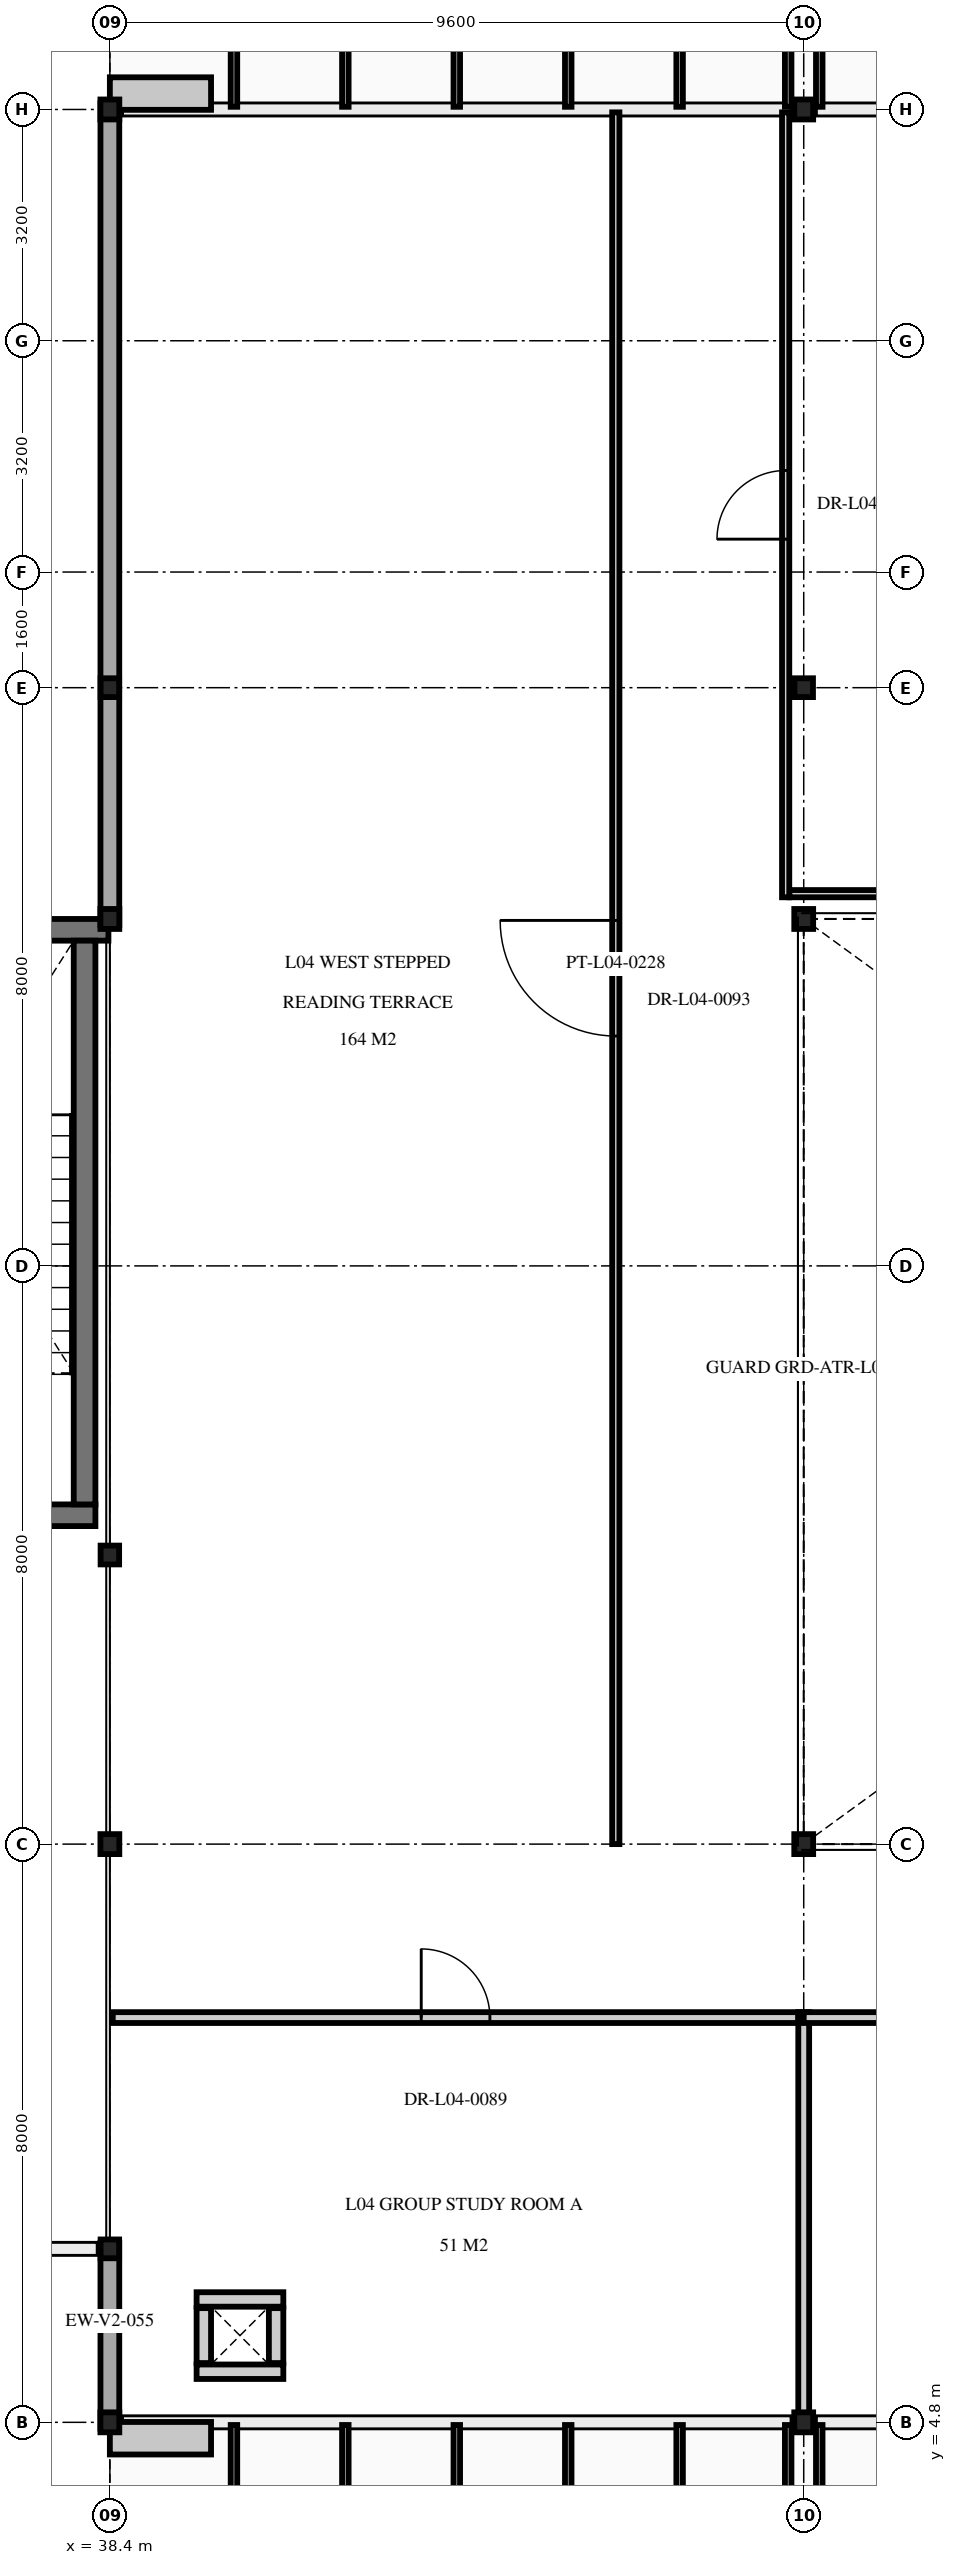
"""IFC4 building model, lengths in metres.
Left out: names, types, materials, properties, quantities, classifications, styles, units other than length and angle.
Written with IfcOpenShell. Run it as: python <this file> out.ifc"""

import sys

from ifc_helpers import new_model, si_unit, direction, frame, frame_2d, origin, origin_2d, place, context, subcontext, project, spatial, rectangle, i_section, extrude, element, fill, save


model = new_model("IFC4")
c1 = context("Model", 3, precision=1e-05, world=origin(), true_north=direction((0.0, 1.0)))
c2 = subcontext(c1, "Body", "Model", "MODEL_VIEW")
j1 = project(units=[si_unit("LENGTHUNIT", "METRE"), si_unit("PLANEANGLEUNIT", "RADIAN")], contexts=[c1])
p1 = place(None, origin())
s1 = spatial("IfcSite", under=j1, at=p1, CompositionType="ELEMENT")
p2 = place(p1, origin())
s2 = spatial("IfcBuilding", under=s1, at=p2, CompositionType="ELEMENT")
p3 = place(p2, frame((0.0, 0.0, 18.6)))
s3 = spatial("IfcBuildingStorey", under=s2, at=p3, CompositionType="ELEMENT", Elevation=18.6)
for number, where, z_axis, x_axis in (
    (1, (38.4, 4.8, 0.0), (0.0, 0.0, 1.0), (1.0, 0.0, 0.0)),
    (2, (38.4, 12.8, 0.0), (0.0, 0.0, 1.0), (1.0, 0.0, 0.0)),
    (3, (38.4, 25.6, 0.0), (0.0, 0.0, 1.0), (1.0, 0.0, 0.0)),
    (4, (38.4, 36.8, 0.0), (0.0, 0.0, 1.0), (1.0, 0.0, 0.0)),
    (5, (48.0, 4.8, 0.0), (0.0, 0.0, 1.0), (1.0, 0.0, 0.0)),
    (6, (48.0, 12.8, 0.0), (0.0, 0.0, 1.0), (1.0, 0.0, 0.0)),
    (7, (48.0, 25.6, 0.0), (0.0, 0.0, 1.0), (1.0, 0.0, 0.0)),
):
    element("IfcColumn", number, at=place(p3, frame(where, z_axis=z_axis, x_axis=x_axis)), inside=s3, PredefinedType="COLUMN", context=c2, shape_type="SweptSolid", body=[
        extrude(i_section(OverallWidth=0.261, OverallDepth=0.276, WebThickness=0.015, FlangeThickness=0.025, at=origin_2d()), origin(), (0.0, 0.0, 1.0), 4.5),
    ])
p4 = place(p3, frame((48.0, 36.8, 0.0), z_axis=(0.0, 0.0, 1.0), x_axis=(1.0, 0.0, 0.0)))
e8 = element("IfcColumn", 8, at=p4, inside=s3, PredefinedType="COLUMN", context=c2, shape_type="SweptSolid", body=[
    extrude(i_section(OverallWidth=0.261, OverallDepth=0.276, WebThickness=0.015, FlangeThickness=0.025, at=origin_2d()), origin(), (0.0, 0.0, 1.0), 4.31),
])
for number, where, z_axis, x_axis in (
    (9, (38.4, 28.8, 0.0), (0.0, 0.0, 1.0), (1.0, 0.0, 0.0)),
    (10, (48.0, 28.8, 0.0), (0.0, 0.0, 1.0), (1.0, 0.0, 0.0)),
    (11, (38.4, 7.2, 0.0), (0.0, 0.0, 1.0), (1.0, 0.0, 0.0)),
    (12, (38.4, 16.8, 0.0), (0.0, 0.0, 1.0), (1.0, 0.0, 0.0)),
):
    element("IfcColumn", number, at=place(p3, frame(where, z_axis=z_axis, x_axis=x_axis)), inside=s3, PredefinedType="COLUMN", context=c2, shape_type="SweptSolid", body=[
        extrude(i_section(OverallWidth=0.256, OverallDepth=0.26, WebThickness=0.01, FlangeThickness=0.017, at=origin_2d()), origin(), (0.0, 0.0, 1.0), 4.5),
    ])
p5 = place(p3, frame((38.2, 17.35, 0.0), z_axis=(0.0, 0.0, 1.0), x_axis=(-1.0, 0.0, 0.0)))
e13 = element("IfcWall", 13, at=p5, inside=s3, PredefinedType="SHEAR", context=c2, shape_type="SweptSolid", body=[
    extrude(rectangle(XDim=4.4, YDim=0.3, at=frame_2d((2.2, 0.0))), origin(), (0.0, 0.0, 1.0), 4.28),
])
p6 = place(p5, frame((1.65, 0.0, 0.0)))
e14 = element("IfcOpeningElement", 14, at=p6, cuts=e13, PredefinedType="OPENING", context=c2, shape_type="SweptSolid", body=[
    extrude(rectangle(XDim=1.1, YDim=2.2, at=frame_2d((0.55, 1.1))), frame((0.0, 0.16, 0.0), z_axis=(0.0, -1.0, 0.0), x_axis=(1.0, 0.0, 0.0)), (0.0, 0.0, 1.0), 0.32),
])
p7 = place(p3, frame((33.62, 25.45, 0.0), z_axis=(0.0, 0.0, 1.0), x_axis=(1.0, 0.0, 0.0)))
e15 = element("IfcWall", 15, at=p7, inside=s3, PredefinedType="SHEAR", context=c2, shape_type="SweptSolid", body=[
    extrude(rectangle(XDim=4.76, YDim=0.3, at=frame_2d((2.38, 0.0))), origin(), (0.0, 0.0, 1.0), 4.28),
])
p8 = place(p3, frame((38.05, 25.3, 0.0), z_axis=(0.0, 0.0, 1.0), x_axis=(0.0, -1.0, 0.0)))
e16 = element("IfcWall", 16, at=p8, inside=s3, PredefinedType="SHEAR", context=c2, shape_type="SweptSolid", body=[
    extrude(rectangle(XDim=7.8, YDim=0.3, at=frame_2d((3.9, 0.0))), origin(), (0.0, 0.0, 1.0), 4.28),
])
for number, where, z_axis, x_axis in (
    (17, (40.8, 5.5, 0.0), (0.0, 0.0, 1.0), (-1.0, 0.0, 0.0)),
    (18, (39.6, 6.5, 0.0), (0.0, 0.0, 1.0), (1.0, 0.0, 0.0)),
):
    element("IfcWall", number, at=place(p3, frame(where, z_axis=z_axis, x_axis=x_axis)), inside=s3, PredefinedType="PARTITIONING", context=c2, shape_type="SweptSolid", body=[
        extrude(rectangle(XDim=1.2, YDim=0.2, at=frame_2d((0.6, 0.0))), origin(), (0.0, 0.0, 1.0), 3.78),
    ])
for number, where, z_axis, x_axis in (
    (19, (39.7, 5.62, 0.0), (0.0, 0.0, 1.0), (0.0, 1.0, 0.0)),
    (20, (40.7, 6.38, 0.0), (0.0, 0.0, 1.0), (0.0, -1.0, 0.0)),
):
    element("IfcWall", number, at=place(p3, frame(where, z_axis=z_axis, x_axis=x_axis)), inside=s3, PredefinedType="PARTITIONING", context=c2, shape_type="SweptSolid", body=[
        extrude(rectangle(XDim=0.76, YDim=0.2, at=frame_2d((0.38, 0.0))), origin(), (0.0, 0.0, 1.0), 3.78),
    ])
p9 = place(p3, frame((38.4, 4.715, 0.0), z_axis=(0.0, 0.0, 1.0), x_axis=(0.0, 1.0, 0.0)))
e21 = element("IfcWall", 21, at=p9, inside=s3, PredefinedType="SOLIDWALL", context=c2, shape_type="SweptSolid", body=[
    extrude(rectangle(XDim=2.57, YDim=0.26, at=frame_2d((1.285, 0.0))), origin(), (0.0, 0.0, 1.0), 3.855),
])
p10 = place(p3, frame((38.4, 25.515, 0.0), z_axis=(0.0, 0.0, 1.0), x_axis=(0.0, 1.0, 0.0)))
e22 = element("IfcWall", 22, at=p10, inside=s3, PredefinedType="SOLIDWALL", context=c2, shape_type="SweptSolid", body=[
    extrude(rectangle(XDim=11.37, YDim=0.26, at=frame_2d((5.685, 0.0))), origin(), (0.0, 0.0, 1.0), 3.855),
])
p11 = place(p3, frame((38.44, 10.4, 0.0), z_axis=(0.0, 0.0, 1.0), x_axis=(1.0, 0.0, 0.0)))
e23 = element("IfcWall", 23, at=p11, inside=s3, PredefinedType="PARTITIONING", context=c2, shape_type="SweptSolid", body=[
    extrude(rectangle(XDim=9.485, YDim=0.15, at=frame_2d((4.743, 0.0))), origin(), (0.0, 0.0, 1.0), 3.925),
])
p12 = place(p11, frame((4.268, 0.0, 0.0)))
e24 = element("IfcOpeningElement", 24, at=p12, cuts=e23, PredefinedType="OPENING", context=c2, shape_type="SweptSolid", body=[
    extrude(rectangle(XDim=0.95, YDim=2.15, at=frame_2d((0.475, 1.075))), frame((0.0, 0.085, 0.0), z_axis=(0.0, -1.0, 0.0), x_axis=(1.0, 0.0, 0.0)), (0.0, 0.0, 1.0), 0.17),
])
p13 = place(p3, frame((48.0, 4.84, 0.0), z_axis=(0.0, 0.0, 1.0), x_axis=(0.0, 1.0, 0.0)))
e25 = element("IfcWall", 25, at=p13, inside=s3, PredefinedType="PARTITIONING", context=c2, shape_type="SweptSolid", body=[
    extrude(rectangle(XDim=5.635, YDim=0.15, at=frame_2d((2.817, 0.0))), origin(), (0.0, 0.0, 1.0), 3.855),
])
p14 = place(p3, frame((48.0, 10.4, 0.0), z_axis=(0.0, 0.0, 1.0), x_axis=(1.0, 0.0, 0.0)))
e26 = element("IfcWall", 26, at=p14, inside=s3, PredefinedType="PARTITIONING", context=c2, shape_type="SweptSolid", body=[
    extrude(rectangle(XDim=9.525, YDim=0.15, at=frame_2d((4.762, 0.0))), origin(), (0.0, 0.0, 1.0), 3.925),
])
p15 = place(p14, frame((4.287, 0.0, 0.0)))
e27 = element("IfcOpeningElement", 27, at=p15, cuts=e26, PredefinedType="OPENING", context=c2, shape_type="SweptSolid", body=[
    extrude(rectangle(XDim=0.95, YDim=2.15, at=frame_2d((0.475, 1.075))), frame((0.0, 0.085, 0.0), z_axis=(0.0, -1.0, 0.0), x_axis=(1.0, 0.0, 0.0)), (0.0, 0.0, 1.0), 0.17),
])
p16 = place(p3, frame((45.4, 12.8, 0.0), z_axis=(0.0, 0.0, 1.0), x_axis=(0.0, 1.0, 0.0)))
e28 = element("IfcWall", 28, at=p16, inside=s3, PredefinedType="MOVABLE", context=c2, shape_type="SweptSolid", body=[
    extrude(rectangle(XDim=23.96, YDim=0.1, at=frame_2d((11.98, 0.0))), origin(), (0.0, 0.0, 1.0), 3.855),
])
p17 = place(p16, frame((11.18, 0.0, 0.0)))
e29 = element("IfcOpeningElement", 29, at=p17, cuts=e28, PredefinedType="OPENING", context=c2, shape_type="SweptSolid", body=[
    extrude(rectangle(XDim=1.6, YDim=2.25, at=frame_2d((0.8, 1.125))), frame((0.0, 0.06, 0.0), z_axis=(0.0, -1.0, 0.0), x_axis=(1.0, 0.0, 0.0)), (0.0, 0.0, 1.0), 0.12),
])
p18 = place(p3, frame((47.8, 25.95, 0.0), z_axis=(0.0, 0.0, 1.0), x_axis=(1.0, 0.0, 0.0)))
e30 = element("IfcWall", 30, at=p18, inside=s3, PredefinedType="MOVABLE", context=c2, shape_type="SweptSolid", body=[
    extrude(rectangle(XDim=9.75, YDim=0.1, at=frame_2d((4.875, 0.0))), origin(), (0.0, 0.0, 1.0), 3.925),
])
p19 = place(p3, frame((47.75, 25.9, 0.0), z_axis=(0.0, 0.0, 1.0), x_axis=(0.0, 1.0, 0.0)))
e31 = element("IfcWall", 31, at=p19, inside=s3, PredefinedType="MOVABLE", context=c2, shape_type="SweptSolid", body=[
    extrude(rectangle(XDim=10.86, YDim=0.1, at=frame_2d((5.43, 0.0))), origin(), (0.0, 0.0, 1.0), 3.855),
])
p20 = place(p19, frame((4.955, 0.0, 0.0)))
e32 = element("IfcOpeningElement", 32, at=p20, cuts=e31, PredefinedType="OPENING", context=c2, shape_type="SweptSolid", body=[
    extrude(rectangle(XDim=0.95, YDim=2.15, at=frame_2d((0.475, 1.075))), frame((0.0, 0.06, 0.0), z_axis=(0.0, -1.0, 0.0), x_axis=(1.0, 0.0, 0.0)), (0.0, 0.0, 1.0), 0.12),
])
p21 = place(p12, origin())
e33 = element("IfcDoor", 33, at=p21, inside=s3, OperationType="SINGLE_SWING_LEFT", PredefinedType="DOOR", context=c2, shape_type="SweptSolid", body=[
    extrude(rectangle(XDim=0.95, YDim=2.15, at=frame_2d((0.475, 1.075))), frame((0.0, 0.025, 0.0), z_axis=(0.0, -1.0, 0.0), x_axis=(1.0, 0.0, 0.0)), (0.0, 0.0, 1.0), 0.05),
])
fill(e24, e33)
p22 = place(p17, origin())
e34 = element("IfcDoor", 34, at=p22, inside=s3, OperationType="DOUBLE_DOOR_SINGLE_SWING", PredefinedType="DOOR", context=c2, shape_type="SweptSolid", body=[
    extrude(rectangle(XDim=1.6, YDim=2.25, at=frame_2d((0.8, 1.125))), frame((0.0, 0.025, 0.0), z_axis=(0.0, -1.0, 0.0), x_axis=(1.0, 0.0, 0.0)), (0.0, 0.0, 1.0), 0.05),
])
fill(e29, e34)
p23 = place(p20, origin())
e35 = element("IfcDoor", 35, at=p23, inside=s3, OperationType="SINGLE_SWING_LEFT", PredefinedType="DOOR", context=c2, shape_type="SweptSolid", body=[
    extrude(rectangle(XDim=0.95, YDim=2.15, at=frame_2d((0.475, 1.075))), frame((0.0, 0.025, 0.0), z_axis=(0.0, -1.0, 0.0), x_axis=(1.0, 0.0, 0.0)), (0.0, 0.0, 1.0), 0.05),
])
fill(e32, e35)
save(model, sys.argv[1])
